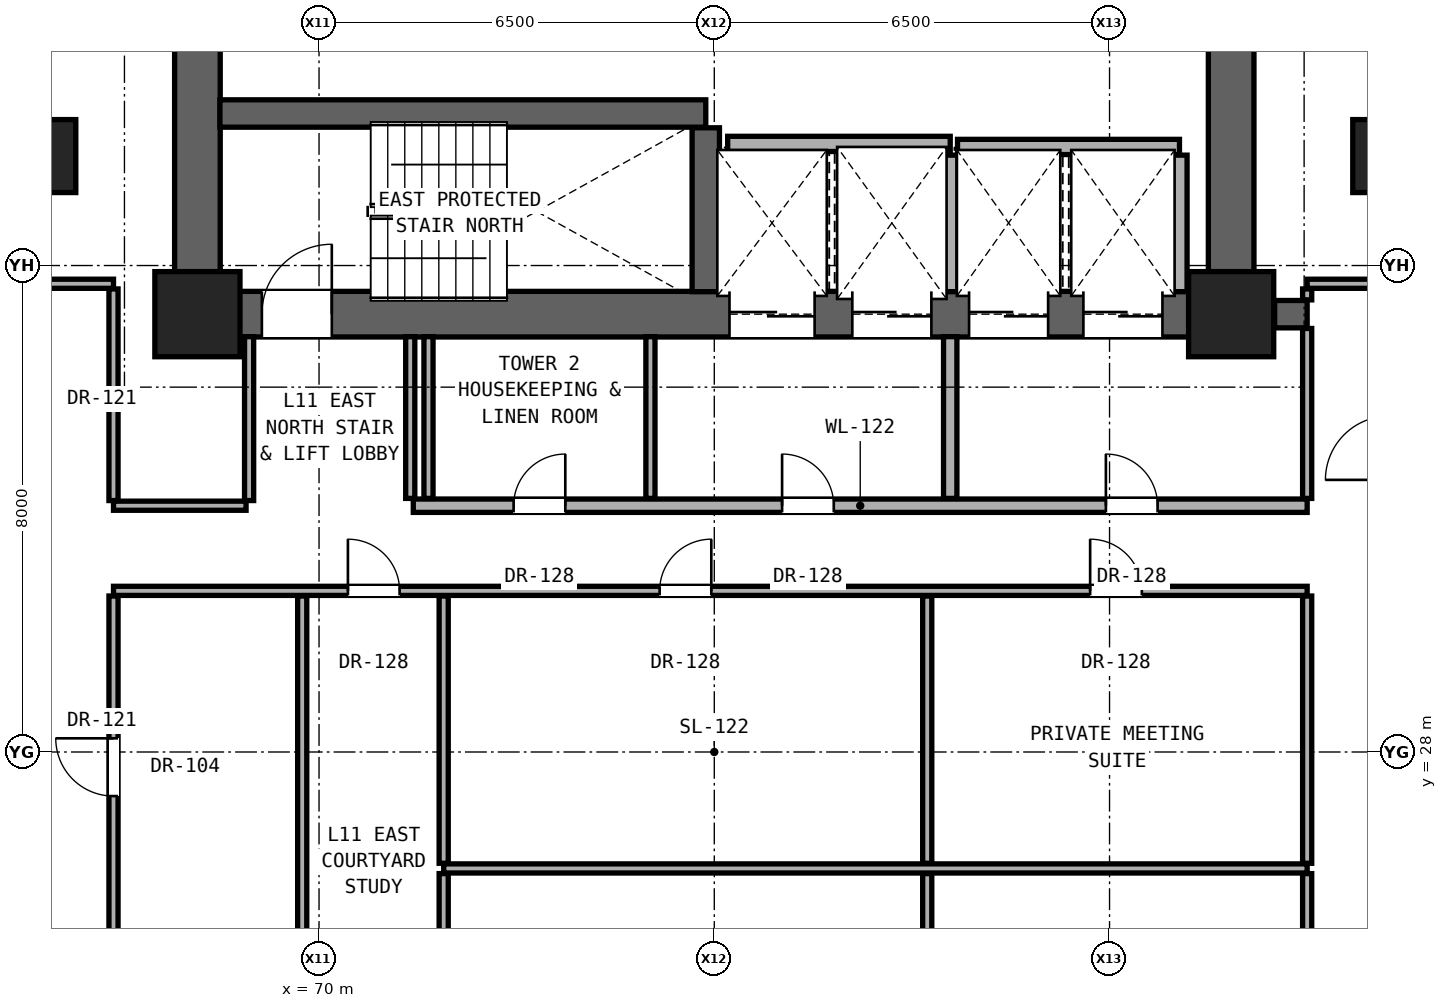
"""IFC4 building model, lengths in metres.
Left out: names, types, materials, properties, quantities, classifications, styles, units other than length and angle.
Written with IfcOpenShell. Run it as: python <this file> out.ifc"""

import sys

from ifc_helpers import new_model, si_unit, direction, frame, frame_2d, origin, origin_2d, place, context, subcontext, project, spatial, rectangle, extrude, element, fill, save


model = new_model("IFC4")
c1 = context("Model", 3, precision=1e-05, world=origin(), true_north=direction((0.0, 1.0)))
c2 = subcontext(c1, "Body", "Model", "MODEL_VIEW")
j1 = project(units=[si_unit("LENGTHUNIT", "METRE"), si_unit("PLANEANGLEUNIT", "RADIAN")], contexts=[c1])
p1 = place(None, origin())
s1 = spatial("IfcSite", under=j1, at=p1, CompositionType="ELEMENT")
p2 = place(p1, origin())
s2 = spatial("IfcBuilding", under=s1, at=p2, CompositionType="ELEMENT")
p3 = place(p2, frame((0.0, 0.0, 42.2)))
s3 = spatial("IfcBuildingStorey", under=s2, at=p3, CompositionType="ELEMENT", Elevation=42.2)
for number, where, z_axis, x_axis in (
    (1, (68.0, 35.2, 0.0), (0.0, 0.0, 1.0), (1.0, 0.0, 0.0)),
    (2, (85.0, 35.2, 0.0), (0.0, 0.0, 1.0), (1.0, 0.0, 0.0)),
):
    element("IfcColumn", number, at=place(p3, frame(where, z_axis=z_axis, x_axis=x_axis)), inside=s3, PredefinedType="COLUMN", context=c2, shape_type="SweptSolid", body=[
        extrude(rectangle(XDim=1.4, YDim=1.4, at=origin_2d()), origin(), (0.0, 0.0, 1.0), 3.3),
    ])
for number, where, z_axis, x_axis in (
    (3, (65.6, 37.8, 0.0), (0.0, 0.0, 1.0), (1.0, 0.0, 0.0)),
    (4, (87.4, 37.8, 0.0), (0.0, 0.0, 1.0), (1.0, 0.0, 0.0)),
):
    element("IfcColumn", number, at=place(p3, frame(where, z_axis=z_axis, x_axis=x_axis)), inside=s3, PredefinedType="PILASTER", context=c2, shape_type="SweptSolid", body=[
        extrude(rectangle(XDim=0.8, YDim=1.2, at=origin_2d()), origin(), (0.0, 0.0, 1.0), 3.3),
    ])
for number, where, z_axis, x_axis in (
    (5, (68.0, 35.2, 0.0), (0.0, 0.0, 1.0), (0.0, 1.0, 0.0)),
    (6, (85.0, 35.2, 0.0), (0.0, 0.0, 1.0), (0.0, 1.0, 0.0)),
):
    element("IfcWall", number, at=place(p3, frame(where, z_axis=z_axis, x_axis=x_axis)), inside=s3, PredefinedType="SHEAR", context=c2, shape_type="SweptSolid", body=[
        extrude(rectangle(XDim=5.6, YDim=0.75, at=frame_2d((2.8, 0.0))), origin(), (0.0, 0.0, 1.0), 3.06),
    ])
p4 = place(p3, frame((68.0, 35.2, 0.0), z_axis=(0.0, 0.0, 1.0), x_axis=(1.0, 0.0, 0.0)))
e7 = element("IfcWall", 7, at=p4, inside=s3, PredefinedType="SHEAR", context=c2, shape_type="SweptSolid", body=[
    extrude(rectangle(XDim=17.0, YDim=0.75, at=frame_2d((8.5, 0.0))), origin(), (0.0, 0.0, 1.0), 3.06),
])
p5 = place(p4, frame((1.06, 0.0, 0.0)))
e8 = element("IfcOpeningElement", 8, at=p5, cuts=e7, PredefinedType="OPENING", context=c2, shape_type="SweptSolid", body=[
    extrude(rectangle(XDim=1.15, YDim=2.2, at=frame_2d((0.575, 1.1))), frame((0.0, 0.385, 0.0), z_axis=(0.0, -1.0, 0.0), x_axis=(1.0, 0.0, 0.0)), (0.0, 0.0, 1.0), 0.77),
])
p6 = place(p4, frame((8.75, 0.0, 0.0)))
e9 = element("IfcOpeningElement", 9, at=p6, cuts=e7, PredefinedType="OPENING", context=c2, shape_type="SweptSolid", body=[
    extrude(rectangle(XDim=1.4, YDim=2.35, at=frame_2d((0.7, 1.175))), frame((0.0, 0.385, 0.0), z_axis=(0.0, -1.0, 0.0), x_axis=(1.0, 0.0, 0.0)), (0.0, 0.0, 1.0), 0.77),
])
p7 = place(p4, frame((10.77, 0.0, 0.0)))
e10 = element("IfcOpeningElement", 10, at=p7, cuts=e7, PredefinedType="OPENING", context=c2, shape_type="SweptSolid", body=[
    extrude(rectangle(XDim=1.3, YDim=2.3, at=frame_2d((0.65, 1.15))), frame((0.0, 0.385, 0.0), z_axis=(0.0, -1.0, 0.0), x_axis=(1.0, 0.0, 0.0)), (0.0, 0.0, 1.0), 0.77),
])
p8 = place(p4, frame((12.69, 0.0, 0.0)))
e11 = element("IfcOpeningElement", 11, at=p8, cuts=e7, PredefinedType="OPENING", context=c2, shape_type="SweptSolid", body=[
    extrude(rectangle(XDim=1.3, YDim=2.3, at=frame_2d((0.65, 1.15))), frame((0.0, 0.385, 0.0), z_axis=(0.0, -1.0, 0.0), x_axis=(1.0, 0.0, 0.0)), (0.0, 0.0, 1.0), 0.77),
])
p9 = place(p4, frame((14.57, 0.0, 0.0)))
e12 = element("IfcOpeningElement", 12, at=p9, cuts=e7, PredefinedType="OPENING", context=c2, shape_type="SweptSolid", body=[
    extrude(rectangle(XDim=1.3, YDim=2.3, at=frame_2d((0.65, 1.15))), frame((0.0, 0.385, 0.0), z_axis=(0.0, -1.0, 0.0), x_axis=(1.0, 0.0, 0.0)), (0.0, 0.0, 1.0), 0.77),
])
p10 = place(p3, frame((72.05, 26.085, 0.0), z_axis=(0.0, 0.0, 1.0), x_axis=(1.0, 0.0, 0.0)))
e13 = element("IfcWall", 13, at=p10, inside=s3, PredefinedType="PARTITIONING", context=c2, shape_type="SweptSolid", body=[
    extrude(rectangle(XDim=14.2, YDim=0.15, at=frame_2d((7.1, 0.0))), origin(), (0.0, 0.0, 1.0), 2.125),
])
p11 = place(p3, frame((66.62, 30.65, 0.0), z_axis=(0.0, 0.0, 1.0), x_axis=(1.0, 0.0, 0.0)))
e14 = element("IfcWall", 14, at=p11, inside=s3, PredefinedType="PARTITIONING", context=c2, shape_type="SweptSolid", body=[
    extrude(rectangle(XDim=19.63, YDim=0.15, at=frame_2d((9.815, 0.0))), origin(), (0.0, 0.0, 1.0), 2.125),
])
p12 = place(p11, frame((3.855, 0.0, 0.0)))
e15 = element("IfcOpeningElement", 15, at=p12, cuts=e14, PredefinedType="OPENING", context=c2, shape_type="SweptSolid", body=[
    extrude(rectangle(XDim=0.85, YDim=2.01, at=frame_2d((0.425, 1.005))), frame((0.0, 0.085, 0.0), z_axis=(0.0, -1.0, 0.0), x_axis=(1.0, 0.0, 0.0)), (0.0, 0.0, 1.0), 0.17),
])
p13 = place(p11, frame((8.981, 0.0, 0.0)))
e16 = element("IfcOpeningElement", 16, at=p13, cuts=e14, PredefinedType="OPENING", context=c2, shape_type="SweptSolid", body=[
    extrude(rectangle(XDim=0.85, YDim=2.01, at=frame_2d((0.425, 1.005))), frame((0.0, 0.085, 0.0), z_axis=(0.0, -1.0, 0.0), x_axis=(1.0, 0.0, 0.0)), (0.0, 0.0, 1.0), 0.17),
])
p14 = place(p11, frame((16.061, 0.0, 0.0)))
e17 = element("IfcOpeningElement", 17, at=p14, cuts=e14, PredefinedType="OPENING", context=c2, shape_type="SweptSolid", body=[
    extrude(rectangle(XDim=0.85, YDim=2.01, at=frame_2d((0.425, 1.005))), frame((0.0, 0.085, 0.0), z_axis=(0.0, -1.0, 0.0), x_axis=(1.0, 0.0, 0.0)), (0.0, 0.0, 1.0), 0.17),
])
p15 = place(p3, frame((66.62, 32.05, 0.0), z_axis=(0.0, 0.0, 1.0), x_axis=(1.0, 0.0, 0.0)))
e18 = element("IfcWall", 18, at=p15, inside=s3, PredefinedType="PARTITIONING", context=c2, shape_type="SweptSolid", body=[
    extrude(rectangle(XDim=2.18, YDim=0.15, at=frame_2d((1.09, 0.0))), origin(), (0.0, 0.0, 1.0), 2.125),
])
p16 = place(p3, frame((71.55, 32.05, 0.0), z_axis=(0.0, 0.0, 1.0), x_axis=(1.0, 0.0, 0.0)))
e19 = element("IfcWall", 19, at=p16, inside=s3, PredefinedType="SOLIDWALL", context=c2, shape_type="SweptSolid", body=[
    extrude(rectangle(XDim=14.7, YDim=0.22, at=frame_2d((7.35, 0.0))), origin(), (0.0, 0.0, 1.0), 2.125),
])
p17 = place(p16, frame((11.39, 0.0, 0.0)))
e20 = element("IfcOpeningElement", 20, at=p17, cuts=e19, PredefinedType="OPENING", context=c2, shape_type="SweptSolid", body=[
    extrude(rectangle(XDim=0.85, YDim=2.01, at=frame_2d((0.425, 1.005))), frame((0.0, 0.12, 0.0), z_axis=(0.0, -1.0, 0.0), x_axis=(1.0, 0.0, 0.0)), (0.0, 0.0, 1.0), 0.24),
])
p18 = place(p16, frame((6.065, 0.0, 0.0)))
e21 = element("IfcOpeningElement", 21, at=p18, cuts=e19, PredefinedType="OPENING", context=c2, shape_type="SweptSolid", body=[
    extrude(rectangle(XDim=0.85, YDim=2.01, at=frame_2d((0.425, 1.005))), frame((0.0, 0.12, 0.0), z_axis=(0.0, -1.0, 0.0), x_axis=(1.0, 0.0, 0.0)), (0.0, 0.0, 1.0), 0.24),
])
p19 = place(p16, frame((1.65, 0.0, 0.0)))
e22 = element("IfcOpeningElement", 22, at=p19, cuts=e19, PredefinedType="OPENING", context=c2, shape_type="SweptSolid", body=[
    extrude(rectangle(XDim=0.85, YDim=2.01, at=frame_2d((0.425, 1.005))), frame((0.0, 0.12, 0.0), z_axis=(0.0, -1.0, 0.0), x_axis=(1.0, 0.0, 0.0)), (0.0, 0.0, 1.0), 0.24),
])
p20 = place(p3, frame((85.715, 35.2, 0.0), z_axis=(0.0, 0.0, 1.0), x_axis=(1.0, 0.0, 0.0)))
e23 = element("IfcWall", 23, at=p20, inside=s3, PredefinedType="SHEAR", context=c2, shape_type="SweptSolid", body=[
    extrude(rectangle(XDim=0.535, YDim=0.45, at=frame_2d((0.268, 0.0))), origin(), (0.0, 0.0, 1.0), 3.06),
])
p21 = place(p3, frame((65.25, 35.7, 0.0), z_axis=(0.0, 0.0, 1.0), x_axis=(1.0, 0.0, 0.0)))
e24 = element("IfcWall", 24, at=p21, inside=s3, PredefinedType="PARTITIONING", context=c2, shape_type="SweptSolid", body=[
    extrude(rectangle(XDim=1.37, YDim=0.15, at=frame_2d((0.685, 0.0))), origin(), (0.0, 0.0, 1.0), 3.06),
])
p22 = place(p3, frame((86.25, 35.7, 0.0), z_axis=(0.0, 0.0, 1.0), x_axis=(1.0, 0.0, 0.0)))
e25 = element("IfcWall", 25, at=p22, inside=s3, PredefinedType="PARTITIONING", context=c2, shape_type="SweptSolid", body=[
    extrude(rectangle(XDim=1.35, YDim=0.15, at=frame_2d((0.675, 0.0))), origin(), (0.0, 0.0, 1.0), 3.06),
])
p23 = place(p3, frame((80.5, 37.95, 0.0), z_axis=(0.0, 0.0, 1.0), x_axis=(1.0, 0.0, 0.0)))
e26 = element("IfcWall", 26, at=p23, inside=s3, PredefinedType="SOLIDWALL", context=c2, shape_type="SweptSolid", body=[
    extrude(rectangle(XDim=3.65, YDim=0.25, at=frame_2d((1.825, 0.0))), origin(), (0.0, 0.0, 1.0), 3.06),
])
p24 = place(p3, frame((76.72, 38.0, 0.0), z_axis=(0.0, 0.0, 1.0), x_axis=(1.0, 0.0, 0.0)))
e27 = element("IfcWall", 27, at=p24, inside=s3, PredefinedType="SOLIDWALL", context=c2, shape_type="SweptSolid", body=[
    extrude(rectangle(XDim=3.66, YDim=0.25, at=frame_2d((1.83, 0.0))), origin(), (0.0, 0.0, 1.0), 3.06),
])
p25 = place(p3, frame((68.37, 38.5, 0.0), z_axis=(0.0, 0.0, 1.0), x_axis=(1.0, 0.0, 0.0)))
e28 = element("IfcWall", 28, at=p25, inside=s3, PredefinedType="SHEAR", context=c2, shape_type="SweptSolid", body=[
    extrude(rectangle(XDim=7.99, YDim=0.45, at=frame_2d((3.995, 0.0))), origin(), (0.0, 0.0, 1.0), 3.06),
])
p26 = place(p3, frame((66.62, 24.935, 0.0), z_axis=(0.0, 0.0, 1.0), x_axis=(0.0, 1.0, 0.0)))
e29 = element("IfcWall", 29, at=p26, inside=s3, PredefinedType="PARTITIONING", context=c2, shape_type="SweptSolid", body=[
    extrude(rectangle(XDim=5.63, YDim=0.15, at=frame_2d((2.815, 0.0))), origin(), (0.0, 0.0, 1.0), 2.279),
])
p27 = place(p26, frame((2.34, 0.0, 0.0)))
e30 = element("IfcOpeningElement", 30, at=p27, cuts=e29, PredefinedType="OPENING", context=c2, shape_type="SweptSolid", body=[
    extrude(rectangle(XDim=0.95, YDim=2.15, at=frame_2d((0.475, 1.075))), frame((0.0, 0.085, 0.0), z_axis=(0.0, -1.0, 0.0), x_axis=(1.0, 0.0, 0.0)), (0.0, 0.0, 1.0), 0.17),
])
p28 = place(p3, frame((66.62, 32.135, 0.0), z_axis=(0.0, 0.0, 1.0), x_axis=(0.0, 1.0, 0.0)))
e31 = element("IfcWall", 31, at=p28, inside=s3, PredefinedType="PARTITIONING", context=c2, shape_type="SweptSolid", body=[
    extrude(rectangle(XDim=3.48, YDim=0.15, at=frame_2d((1.74, 0.0))), origin(), (0.0, 0.0, 1.0), 2.452),
])
p29 = place(p3, frame((68.85, 32.135, 0.0), z_axis=(0.0, 0.0, 1.0), x_axis=(0.0, 1.0, 0.0)))
e32 = element("IfcWall", 32, at=p29, inside=s3, PredefinedType="PARTITIONING", context=c2, shape_type="SweptSolid", body=[
    extrude(rectangle(XDim=2.695, YDim=0.15, at=frame_2d((1.348, 0.0))), origin(), (0.0, 0.0, 1.0), 3.06),
])
p30 = place(p3, frame((69.723, 24.935, 0.0), z_axis=(0.0, 0.0, 1.0), x_axis=(0.0, 1.0, 0.0)))
e33 = element("IfcWall", 33, at=p30, inside=s3, PredefinedType="PARTITIONING", context=c2, shape_type="SweptSolid", body=[
    extrude(rectangle(XDim=5.63, YDim=0.15, at=frame_2d((2.815, 0.0))), origin(), (0.0, 0.0, 1.0), 2.125),
])
for number, where, z_axis, x_axis in (
    (34, (71.5, 32.17, 0.0), (0.0, 0.0, 1.0), (0.0, 1.0, 0.0)),
    (35, (71.8, 32.17, 0.0), (0.0, 0.0, 1.0), (0.0, 1.0, 0.0)),
):
    element("IfcWall", number, at=place(p3, frame(where, z_axis=z_axis, x_axis=x_axis)), inside=s3, PredefinedType="PARTITIONING", context=c2, shape_type="SweptSolid", body=[
        extrude(rectangle(XDim=2.66, YDim=0.15, at=frame_2d((1.33, 0.0))), origin(), (0.0, 0.0, 1.0), 3.06),
    ])
p31 = place(p3, frame((72.05, 22.435, 0.0), z_axis=(0.0, 0.0, 1.0), x_axis=(0.0, 1.0, 0.0)))
e36 = element("IfcWall", 36, at=p31, inside=s3, PredefinedType="PARTITIONING", context=c2, shape_type="SweptSolid", body=[
    extrude(rectangle(XDim=3.565, YDim=0.15, at=frame_2d((1.782, 0.0))), origin(), (0.0, 0.0, 1.0), 2.589),
])
p32 = place(p3, frame((72.05, 26.17, 0.0), z_axis=(0.0, 0.0, 1.0), x_axis=(0.0, 1.0, 0.0)))
e37 = element("IfcWall", 37, at=p32, inside=s3, PredefinedType="PARTITIONING", context=c2, shape_type="SweptSolid", body=[
    extrude(rectangle(XDim=4.395, YDim=0.15, at=frame_2d((2.198, 0.0))), origin(), (0.0, 0.0, 1.0), 2.125),
])
p33 = place(p3, frame((75.45, 32.17, 0.0), z_axis=(0.0, 0.0, 1.0), x_axis=(0.0, 1.0, 0.0)))
e38 = element("IfcWall", 38, at=p33, inside=s3, PredefinedType="PARTITIONING", context=c2, shape_type="SweptSolid", body=[
    extrude(rectangle(XDim=2.66, YDim=0.15, at=frame_2d((1.33, 0.0))), origin(), (0.0, 0.0, 1.0), 3.06),
])
p34 = place(p3, frame((76.36, 35.57, 0.0), z_axis=(0.0, 0.0, 1.0), x_axis=(0.0, 1.0, 0.0)))
e39 = element("IfcWall", 39, at=p34, inside=s3, PredefinedType="SHEAR", context=c2, shape_type="SweptSolid", body=[
    extrude(rectangle(XDim=2.695, YDim=0.45, at=frame_2d((1.347, 0.0))), origin(), (0.0, 0.0, 1.0), 3.06),
])
p35 = place(p3, frame((80.002, 22.435, 0.0), z_axis=(0.0, 0.0, 1.0), x_axis=(0.0, 1.0, 0.0)))
e40 = element("IfcWall", 40, at=p35, inside=s3, PredefinedType="PARTITIONING", context=c2, shape_type="SweptSolid", body=[
    extrude(rectangle(XDim=3.565, YDim=0.15, at=frame_2d((1.782, 0.0))), origin(), (0.0, 0.0, 1.0), 3.06),
])
p36 = place(p3, frame((80.002, 26.17, 0.0), z_axis=(0.0, 0.0, 1.0), x_axis=(0.0, 1.0, 0.0)))
e41 = element("IfcWall", 41, at=p36, inside=s3, PredefinedType="PARTITIONING", context=c2, shape_type="SweptSolid", body=[
    extrude(rectangle(XDim=4.395, YDim=0.15, at=frame_2d((2.198, 0.0))), origin(), (0.0, 0.0, 1.0), 2.125),
])
p37 = place(p3, frame((80.38, 32.17, 0.0), z_axis=(0.0, 0.0, 1.0), x_axis=(0.0, 1.0, 0.0)))
e42 = element("IfcWall", 42, at=p37, inside=s3, PredefinedType="SOLIDWALL", context=c2, shape_type="SweptSolid", body=[
    extrude(rectangle(XDim=2.66, YDim=0.22, at=frame_2d((1.33, 0.0))), origin(), (0.0, 0.0, 1.0), 3.06),
])
for number, where, z_axis, x_axis in (
    (43, (80.38, 35.57, 0.0), (0.0, 0.0, 1.0), (0.0, 1.0, 0.0)),
    (44, (84.15, 35.57, 0.0), (0.0, 0.0, 1.0), (0.0, 1.0, 0.0)),
):
    element("IfcWall", number, at=place(p3, frame(where, z_axis=z_axis, x_axis=x_axis)), inside=s3, PredefinedType="SOLIDWALL", context=c2, shape_type="SweptSolid", body=[
        extrude(rectangle(XDim=2.245, YDim=0.25, at=frame_2d((1.123, 0.0))), origin(), (0.0, 0.0, 1.0), 3.06),
    ])
p38 = place(p3, frame((86.25, 22.435, 0.0), z_axis=(0.0, 0.0, 1.0), x_axis=(0.0, 1.0, 0.0)))
e45 = element("IfcWall", 45, at=p38, inside=s3, PredefinedType="PARTITIONING", context=c2, shape_type="SweptSolid", body=[
    extrude(rectangle(XDim=3.565, YDim=0.15, at=frame_2d((1.782, 0.0))), origin(), (0.0, 0.0, 1.0), 3.06),
])
p39 = place(p3, frame((86.25, 26.17, 0.0), z_axis=(0.0, 0.0, 1.0), x_axis=(0.0, 1.0, 0.0)))
e46 = element("IfcWall", 46, at=p39, inside=s3, PredefinedType="PARTITIONING", context=c2, shape_type="SweptSolid", body=[
    extrude(rectangle(XDim=4.395, YDim=0.15, at=frame_2d((2.198, 0.0))), origin(), (0.0, 0.0, 1.0), 2.279),
])
p40 = place(p3, frame((86.25, 32.17, 0.0), z_axis=(0.0, 0.0, 1.0), x_axis=(0.0, 1.0, 0.0)))
e47 = element("IfcWall", 47, at=p40, inside=s3, PredefinedType="PARTITIONING", context=c2, shape_type="SweptSolid", body=[
    extrude(rectangle(XDim=2.795, YDim=0.15, at=frame_2d((1.397, 0.0))), origin(), (0.0, 0.0, 1.0), 2.452),
])
p41 = place(p3, frame((86.25, 35.435, 0.0), z_axis=(0.0, 0.0, 1.0), x_axis=(0.0, 1.0, 0.0)))
e48 = element("IfcWall", 48, at=p41, inside=s3, PredefinedType="PARTITIONING", context=c2, shape_type="SweptSolid", body=[
    extrude(rectangle(XDim=0.18, YDim=0.15, at=frame_2d((0.09, 0.0))), origin(), (0.0, 0.0, 1.0), 2.452),
])
p42 = place(p17, origin())
e49 = element("IfcDoor", 49, at=p42, inside=s3, OperationType="SINGLE_SWING_LEFT", PredefinedType="DOOR", context=c2, shape_type="SweptSolid", body=[
    extrude(rectangle(XDim=0.85, YDim=2.01, at=frame_2d((0.425, 1.005))), frame((0.0, 0.025, 0.0), z_axis=(0.0, -1.0, 0.0), x_axis=(1.0, 0.0, 0.0)), (0.0, 0.0, 1.0), 0.05),
])
fill(e20, e49)
p43 = place(p5, origin())
e50 = element("IfcDoor", 50, at=p43, inside=s3, OperationType="SINGLE_SWING_RIGHT", PredefinedType="DOOR", context=c2, shape_type="SweptSolid", body=[
    extrude(rectangle(XDim=1.15, YDim=2.2, at=frame_2d((0.575, 1.1))), frame((0.0, 0.025, 0.0), z_axis=(0.0, -1.0, 0.0), x_axis=(1.0, 0.0, 0.0)), (0.0, 0.0, 1.0), 0.05),
])
fill(e8, e50)
p44 = place(p18, origin())
e51 = element("IfcDoor", 51, at=p44, inside=s3, OperationType="SINGLE_SWING_LEFT", PredefinedType="DOOR", context=c2, shape_type="SweptSolid", body=[
    extrude(rectangle(XDim=0.85, YDim=2.01, at=frame_2d((0.425, 1.005))), frame((0.0, 0.025, 0.0), z_axis=(0.0, -1.0, 0.0), x_axis=(1.0, 0.0, 0.0)), (0.0, 0.0, 1.0), 0.05),
])
fill(e21, e51)
p45 = place(p19, origin())
e52 = element("IfcDoor", 52, at=p45, inside=s3, OperationType="SINGLE_SWING_RIGHT", PredefinedType="DOOR", context=c2, shape_type="SweptSolid", body=[
    extrude(rectangle(XDim=0.85, YDim=2.01, at=frame_2d((0.425, 1.005))), frame((0.0, 0.025, 0.0), z_axis=(0.0, -1.0, 0.0), x_axis=(1.0, 0.0, 0.0)), (0.0, 0.0, 1.0), 0.05),
])
fill(e22, e52)
p46 = place(p27, origin())
e53 = element("IfcDoor", 53, at=p46, inside=s3, OperationType="SINGLE_SWING_RIGHT", PredefinedType="DOOR", context=c2, shape_type="SweptSolid", body=[
    extrude(rectangle(XDim=0.95, YDim=2.15, at=frame_2d((0.475, 1.075))), frame((0.0, 0.025, 0.0), z_axis=(0.0, -1.0, 0.0), x_axis=(1.0, 0.0, 0.0)), (0.0, 0.0, 1.0), 0.05),
])
fill(e30, e53)
p47 = place(p12, origin())
e54 = element("IfcDoor", 54, at=p47, inside=s3, OperationType="SINGLE_SWING_LEFT", PredefinedType="DOOR", context=c2, shape_type="SweptSolid", body=[
    extrude(rectangle(XDim=0.85, YDim=2.01, at=frame_2d((0.425, 1.005))), frame((0.0, 0.025, 0.0), z_axis=(0.0, -1.0, 0.0), x_axis=(1.0, 0.0, 0.0)), (0.0, 0.0, 1.0), 0.05),
])
fill(e15, e54)
p48 = place(p13, origin())
e55 = element("IfcDoor", 55, at=p48, inside=s3, OperationType="SINGLE_SWING_RIGHT", PredefinedType="DOOR", context=c2, shape_type="SweptSolid", body=[
    extrude(rectangle(XDim=0.85, YDim=2.01, at=frame_2d((0.425, 1.005))), frame((0.0, 0.025, 0.0), z_axis=(0.0, -1.0, 0.0), x_axis=(1.0, 0.0, 0.0)), (0.0, 0.0, 1.0), 0.05),
])
fill(e16, e55)
p49 = place(p14, origin())
e56 = element("IfcDoor", 56, at=p49, inside=s3, OperationType="SINGLE_SWING_LEFT", PredefinedType="DOOR", context=c2, shape_type="SweptSolid", body=[
    extrude(rectangle(XDim=0.85, YDim=2.01, at=frame_2d((0.425, 1.005))), frame((0.0, 0.025, 0.0), z_axis=(0.0, -1.0, 0.0), x_axis=(1.0, 0.0, 0.0)), (0.0, 0.0, 1.0), 0.05),
])
fill(e17, e56)
p50 = place(p6, origin())
e57 = element("IfcDoor", 57, at=p50, inside=s3, OperationType="DOUBLE_DOOR_SLIDING", PredefinedType="DOOR", context=c2, shape_type="SweptSolid", body=[
    extrude(rectangle(XDim=1.4, YDim=2.35, at=frame_2d((0.7, 1.175))), frame((0.0, 0.025, 0.0), z_axis=(0.0, -1.0, 0.0), x_axis=(1.0, 0.0, 0.0)), (0.0, 0.0, 1.0), 0.05),
])
fill(e9, e57)
p51 = place(p7, origin())
e58 = element("IfcDoor", 58, at=p51, inside=s3, OperationType="DOUBLE_DOOR_SLIDING", PredefinedType="DOOR", context=c2, shape_type="SweptSolid", body=[
    extrude(rectangle(XDim=1.3, YDim=2.3, at=frame_2d((0.65, 1.15))), frame((0.0, 0.025, 0.0), z_axis=(0.0, -1.0, 0.0), x_axis=(1.0, 0.0, 0.0)), (0.0, 0.0, 1.0), 0.05),
])
fill(e10, e58)
p52 = place(p8, origin())
e59 = element("IfcDoor", 59, at=p52, inside=s3, OperationType="DOUBLE_DOOR_SLIDING", PredefinedType="DOOR", context=c2, shape_type="SweptSolid", body=[
    extrude(rectangle(XDim=1.3, YDim=2.3, at=frame_2d((0.65, 1.15))), frame((0.0, 0.025, 0.0), z_axis=(0.0, -1.0, 0.0), x_axis=(1.0, 0.0, 0.0)), (0.0, 0.0, 1.0), 0.05),
])
fill(e11, e59)
p53 = place(p9, origin())
e60 = element("IfcDoor", 60, at=p53, inside=s3, OperationType="DOUBLE_DOOR_SLIDING", PredefinedType="DOOR", context=c2, shape_type="SweptSolid", body=[
    extrude(rectangle(XDim=1.3, YDim=2.3, at=frame_2d((0.65, 1.15))), frame((0.0, 0.025, 0.0), z_axis=(0.0, -1.0, 0.0), x_axis=(1.0, 0.0, 0.0)), (0.0, 0.0, 1.0), 0.05),
])
fill(e12, e60)
save(model, sys.argv[1])
